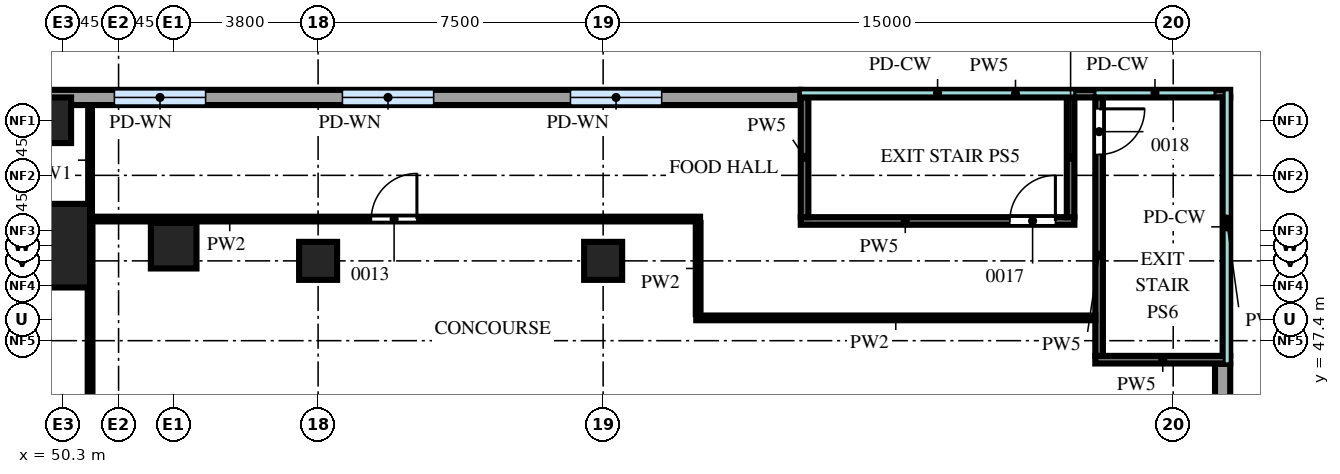
"""IFC4 building model, lengths in metres.
Left out: names, types, materials, properties, quantities, classifications, styles, units other than length and angle.
Written with IfcOpenShell. Run it as: python <this file> out.ifc"""

import sys

from ifc_helpers import new_model, si_unit, direction, frame, frame_2d, origin, origin_2d, place, context, subcontext, project, spatial, rectangle, extrude, source, transform, mapped, element, fill, save


model = new_model("IFC4")
c1 = context("Model", 3, precision=1e-05, world=origin(), true_north=direction((0.0, 1.0)))
c2 = subcontext(c1, "Body", "Model", "MODEL_VIEW")
j1 = project(units=[si_unit("LENGTHUNIT", "METRE"), si_unit("PLANEANGLEUNIT", "RADIAN")], contexts=[c1])
p1 = place(None, origin())
s1 = spatial("IfcSite", under=j1, at=p1, CompositionType="ELEMENT")
p2 = place(p1, origin())
s2 = spatial("IfcBuilding", under=s1, at=p2, CompositionType="ELEMENT")
p3 = place(p2, frame((0.0, 0.0, 13.0)))
s3 = spatial("IfcBuildingStorey", under=s2, at=p3, CompositionType="ELEMENT", Elevation=13.0)
m1 = source(origin(), c2, "Body", "SweptSolid", [
    extrude(rectangle(XDim=2.2, YDim=2.2, at=origin_2d()), origin(), (0.0, 0.0, 1.0), 5.2),
])
p4 = place(p3, frame((49.9, 49.9, 0.0), z_axis=(0.0, 0.0, 1.0), x_axis=(1.0, 0.0, 0.0)))
e1 = element("IfcColumn", 1, at=p4, inside=s3, PredefinedType="COLUMN", context=c2, shape_type="MappedRepresentation", body=[
    mapped(m1, transform((0.0, 0.0, 0.0))),
])
m2 = source(origin(), c2, "Body", "SweptSolid", [
    extrude(rectangle(XDim=1.2, YDim=1.2, at=origin_2d()), origin(), (0.0, 0.0, 1.0), 5.2),
])
for number, where, z_axis, x_axis in (
    (2, (53.2, 49.9, 0.0), (0.0, 0.0, 1.0), (1.0, 0.0, 0.0)),
    (3, (49.9, 53.2, 0.0), (0.0, 0.0, 1.0), (1.0, 0.0, 0.0)),
):
    element("IfcColumn", number, at=place(p3, frame(where, z_axis=z_axis, x_axis=x_axis)), inside=s3, PredefinedType="COLUMN", context=c2, shape_type="MappedRepresentation", body=[
        mapped(m2, transform((0.0, 0.0, 0.0))),
    ])
m3 = source(origin(), c2, "Body", "SweptSolid", [
    extrude(rectangle(XDim=1.0, YDim=1.0, at=origin_2d()), origin(), (0.0, 0.0, 1.0), 5.2),
])
for number, where, z_axis, x_axis in (
    (4, (57.0, 49.5, 0.0), (0.0, 0.0, 1.0), (1.0, 0.0, 0.0)),
    (5, (64.5, 49.5, 0.0), (0.0, 0.0, 1.0), (1.0, 0.0, 0.0)),
):
    element("IfcColumn", number, at=place(p3, frame(where, z_axis=z_axis, x_axis=x_axis)), inside=s3, PredefinedType="COLUMN", context=c2, shape_type="MappedRepresentation", body=[
        mapped(m3, transform((0.0, 0.0, 0.0))),
    ])
m4 = source(origin(), c2, "Body", "SweptSolid", [
    extrude(rectangle(XDim=39.58, YDim=0.4, at=frame_2d((19.79, 0.0))), origin(), (0.0, 0.0, 1.0), 5.2),
])
p5 = place(p3, frame((80.8, 7.21, 0.0), z_axis=(0.0, 0.0, 1.0), x_axis=(0.0, 1.0, 0.0)))
e6 = element("IfcWall", 6, at=p5, inside=s3, PredefinedType="SOLIDWALL", context=c2, shape_type="MappedRepresentation", body=[
    mapped(m4, transform((0.0, 0.0, 0.0))),
])
m5 = source(origin(), c2, "Body", "SweptSolid", [
    extrude(rectangle(XDim=2.4, YDim=2.4, at=frame_2d((1.2, 1.2))), frame((0.0, 0.21, 0.0), z_axis=(0.0, -1.0, 0.0), x_axis=(1.0, 0.0, 0.0)), (0.0, 0.0, 1.0), 0.42),
])
p6 = place(p5, frame((3.6, 0.0, 1.0)))
e7 = element("IfcOpeningElement", 7, at=p6, cuts=e6, PredefinedType="OPENING", context=c2, shape_type="MappedRepresentation", body=[
    mapped(m5, transform((0.0, 0.0, 0.0))),
])
p7 = place(p5, frame((9.6, 0.0, 1.0)))
e8 = element("IfcOpeningElement", 8, at=p7, cuts=e6, PredefinedType="OPENING", context=c2, shape_type="MappedRepresentation", body=[
    mapped(m5, transform((0.0, 0.0, 0.0))),
])
p8 = place(p5, frame((15.6, 0.0, 1.0)))
e9 = element("IfcOpeningElement", 9, at=p8, cuts=e6, PredefinedType="OPENING", context=c2, shape_type="MappedRepresentation", body=[
    mapped(m5, transform((0.0, 0.0, 0.0))),
])
p9 = place(p5, frame((21.6, 0.0, 1.0)))
e10 = element("IfcOpeningElement", 10, at=p9, cuts=e6, PredefinedType="OPENING", context=c2, shape_type="MappedRepresentation", body=[
    mapped(m5, transform((0.0, 0.0, 0.0))),
])
p10 = place(p5, frame((27.6, 0.0, 1.0)))
e11 = element("IfcOpeningElement", 11, at=p10, cuts=e6, PredefinedType="OPENING", context=c2, shape_type="MappedRepresentation", body=[
    mapped(m5, transform((0.0, 0.0, 0.0))),
])
p11 = place(p5, frame((33.6, 0.0, 1.0)))
e12 = element("IfcOpeningElement", 12, at=p11, cuts=e6, PredefinedType="OPENING", context=c2, shape_type="MappedRepresentation", body=[
    mapped(m5, transform((0.0, 0.0, 0.0))),
])
m6 = source(origin(), c2, "Body", "SweptSolid", [
    extrude(rectangle(XDim=27.74, YDim=0.4, at=frame_2d((13.87, 0.0))), origin(), (0.0, 0.0, 1.0), 5.2),
])
p12 = place(p3, frame((69.69, 53.8, 0.0), z_axis=(0.0, 0.0, 1.0), x_axis=(-1.0, 0.0, 0.0)))
e13 = element("IfcWall", 13, at=p12, inside=s3, PredefinedType="SOLIDWALL", context=c2, shape_type="MappedRepresentation", body=[
    mapped(m6, transform((0.0, 0.0, 0.0))),
])
p13 = place(p12, frame((3.65, 0.0, 1.0)))
e14 = element("IfcOpeningElement", 14, at=p13, cuts=e13, PredefinedType="OPENING", context=c2, shape_type="MappedRepresentation", body=[
    mapped(m5, transform((0.0, 0.0, 0.0))),
])
p14 = place(p12, frame((9.65, 0.0, 1.0)))
e15 = element("IfcOpeningElement", 15, at=p14, cuts=e13, PredefinedType="OPENING", context=c2, shape_type="MappedRepresentation", body=[
    mapped(m5, transform((0.0, 0.0, 0.0))),
])
p15 = place(p12, frame((15.65, 0.0, 1.0)))
e16 = element("IfcOpeningElement", 16, at=p15, cuts=e13, PredefinedType="OPENING", context=c2, shape_type="MappedRepresentation", body=[
    mapped(m5, transform((0.0, 0.0, 0.0))),
])
p16 = place(p12, frame((21.65, 0.0, 1.0)))
e17 = element("IfcOpeningElement", 17, at=p16, cuts=e13, PredefinedType="OPENING", context=c2, shape_type="MappedRepresentation", body=[
    mapped(m5, transform((0.0, 0.0, 0.0))),
])
m7 = source(origin(), c2, "Body", "SweptSolid", [
    extrude(rectangle(XDim=7.2, YDim=0.2, at=frame_2d((3.6, 0.0))), origin(), (0.0, 0.0, 1.0), 5.2),
])
p17 = place(p3, frame((69.7, 50.55, 0.0), z_axis=(0.0, 0.0, 1.0), x_axis=(1.0, 0.0, 0.0)))
e18 = element("IfcWall", 18, at=p17, inside=s3, PredefinedType="PARTITIONING", context=c2, shape_type="MappedRepresentation", body=[
    mapped(m7, transform((0.0, 0.0, 0.0))),
])
m8 = source(origin(), c2, "Body", "SweptSolid", [
    extrude(rectangle(XDim=1.2, YDim=2.1, at=frame_2d((0.6, 1.05))), frame((0.0, 0.11, 0.0), z_axis=(0.0, -1.0, 0.0), x_axis=(1.0, 0.0, 0.0)), (0.0, 0.0, 1.0), 0.22),
])
p18 = place(p17, frame((5.5, 0.0, 0.0)))
e19 = element("IfcOpeningElement", 19, at=p18, cuts=e18, PredefinedType="OPENING", context=c2, shape_type="MappedRepresentation", body=[
    mapped(m8, transform((0.0, 0.0, 0.0))),
])
m9 = source(origin(), c2, "Body", "SweptSolid", [
    extrude(rectangle(XDim=11.3, YDim=0.2, at=frame_2d((5.65, 0.0))), origin(), (0.0, 0.0, 1.0), 5.2),
])
p19 = place(p3, frame((69.7, 53.9, 0.0), z_axis=(0.0, 0.0, 1.0), x_axis=(1.0, 0.0, 0.0)))
e20 = element("IfcWall", 20, at=p19, inside=s3, PredefinedType="PARTITIONING", context=c2, shape_type="MappedRepresentation", body=[
    mapped(m9, transform((0.0, 0.0, 0.0))),
])
m10 = source(origin(), c2, "Body", "SweptSolid", [
    extrude(rectangle(XDim=3.15, YDim=0.2, at=frame_2d((1.575, 0.0))), origin(), (0.0, 0.0, 1.0), 5.2),
])
for number, where, z_axis, x_axis in (
    (21, (69.8, 50.65, 0.0), (0.0, 0.0, 1.0), (0.0, 1.0, 0.0)),
    (22, (76.8, 50.65, 0.0), (0.0, 0.0, 1.0), (0.0, 1.0, 0.0)),
):
    element("IfcWall", number, at=place(p3, frame(where, z_axis=z_axis, x_axis=x_axis)), inside=s3, PredefinedType="PARTITIONING", context=c2, shape_type="MappedRepresentation", body=[
        mapped(m10, transform((0.0, 0.0, 0.0))),
    ])
m11 = source(origin(), c2, "Body", "SweptSolid", [
    extrude(rectangle(XDim=3.55, YDim=0.2, at=frame_2d((1.775, 0.0))), origin(), (0.0, 0.0, 1.0), 5.2),
])
p20 = place(p3, frame((77.45, 46.9, 0.0), z_axis=(0.0, 0.0, 1.0), x_axis=(1.0, 0.0, 0.0)))
e23 = element("IfcWall", 23, at=p20, inside=s3, PredefinedType="PARTITIONING", context=c2, shape_type="MappedRepresentation", body=[
    mapped(m11, transform((0.0, 0.0, 0.0))),
])
m12 = source(origin(), c2, "Body", "SweptSolid", [
    extrude(rectangle(XDim=6.8, YDim=0.2, at=frame_2d((3.4, 0.0))), origin(), (0.0, 0.0, 1.0), 5.2),
])
p21 = place(p3, frame((77.55, 47.0, 0.0), z_axis=(0.0, 0.0, 1.0), x_axis=(0.0, 1.0, 0.0)))
e24 = element("IfcWall", 24, at=p21, inside=s3, PredefinedType="PARTITIONING", context=c2, shape_type="MappedRepresentation", body=[
    mapped(m12, transform((0.0, 0.0, 0.0))),
])
p22 = place(p21, frame((5.3, 0.0, 0.0)))
e25 = element("IfcOpeningElement", 25, at=p22, cuts=e24, PredefinedType="OPENING", context=c2, shape_type="MappedRepresentation", body=[
    mapped(m8, transform((0.0, 0.0, 0.0))),
])
p23 = place(p3, frame((80.9, 47.0, 0.0), z_axis=(0.0, 0.0, 1.0), x_axis=(0.0, 1.0, 0.0)))
e26 = element("IfcWall", 26, at=p23, inside=s3, PredefinedType="PARTITIONING", context=c2, shape_type="MappedRepresentation", body=[
    mapped(m12, transform((0.0, 0.0, 0.0))),
])
m13 = source(origin(), c2, "Body", "SweptSolid", [
    extrude(rectangle(XDim=12.9, YDim=0.125, at=frame_2d((6.45, 0.0))), origin(), (0.0, 0.0, 1.0), 5.2),
])
p24 = place(p3, frame((51.0, 37.6, 0.0), z_axis=(0.0, 0.0, 1.0), x_axis=(0.0, 1.0, 0.0)))
e27 = element("IfcWall", 27, at=p24, inside=s3, PredefinedType="PARTITIONING", context=c2, shape_type="MappedRepresentation", body=[
    mapped(m13, transform((0.0, 0.0, 0.0))),
])
m14 = source(origin(), c2, "Body", "SweptSolid", [
    extrude(rectangle(XDim=1.2, YDim=2.1, at=frame_2d((0.6, 1.05))), frame((0.0, 0.073, 0.0), z_axis=(0.0, -1.0, 0.0), x_axis=(1.0, 0.0, 0.0)), (0.0, 0.0, 1.0), 0.145),
])
p25 = place(p24, frame((5.85, 0.0, 0.0)))
e28 = element("IfcOpeningElement", 28, at=p25, cuts=e27, PredefinedType="OPENING", context=c2, shape_type="MappedRepresentation", body=[
    mapped(m14, transform((0.0, 0.0, 0.0))),
])
m15 = source(origin(), c2, "Body", "SweptSolid", [
    extrude(rectangle(XDim=10.5, YDim=0.125, at=frame_2d((5.25, 0.0))), origin(), (0.0, 0.0, 1.0), 5.2),
])
p26 = place(p3, frame((66.95, 48.0, 0.0), z_axis=(0.0, 0.0, 1.0), x_axis=(1.0, 0.0, 0.0)))
e29 = element("IfcWall", 29, at=p26, inside=s3, PredefinedType="PARTITIONING", context=c2, shape_type="MappedRepresentation", body=[
    mapped(m15, transform((0.0, 0.0, 0.0))),
])
m16 = source(origin(), c2, "Body", "SweptSolid", [
    extrude(rectangle(XDim=2.4, YDim=0.125, at=frame_2d((1.2, 0.0))), origin(), (0.0, 0.0, 1.0), 5.2),
])
p27 = place(p3, frame((67.0, 48.1, 0.0), z_axis=(0.0, 0.0, 1.0), x_axis=(0.0, 1.0, 0.0)))
e30 = element("IfcWall", 30, at=p27, inside=s3, PredefinedType="PARTITIONING", context=c2, shape_type="MappedRepresentation", body=[
    mapped(m16, transform((0.0, 0.0, 0.0))),
])
m17 = source(origin(), c2, "Body", "SweptSolid", [
    extrude(rectangle(XDim=16.1, YDim=0.125, at=frame_2d((8.05, 0.0))), origin(), (0.0, 0.0, 1.0), 5.2),
])
p28 = place(p3, frame((50.95, 50.6, 0.0), z_axis=(0.0, 0.0, 1.0), x_axis=(1.0, 0.0, 0.0)))
e31 = element("IfcWall", 31, at=p28, inside=s3, PredefinedType="PARTITIONING", context=c2, shape_type="MappedRepresentation", body=[
    mapped(m17, transform((0.0, 0.0, 0.0))),
])
p29 = place(p28, frame((7.45, 0.0, 0.0)))
e32 = element("IfcOpeningElement", 32, at=p29, cuts=e31, PredefinedType="OPENING", context=c2, shape_type="MappedRepresentation", body=[
    mapped(m14, transform((0.0, 0.0, 0.0))),
])
m18 = source(origin(), c2, "Body", "SweptSolid", [
    extrude(rectangle(XDim=2.9, YDim=0.1, at=frame_2d((1.45, 0.0))), origin(), (0.0, 0.0, 1.0), 5.2),
])
p30 = place(p3, frame((51.0, 50.7, 0.0), z_axis=(0.0, 0.0, 1.0), x_axis=(0.0, 1.0, 0.0)))
e33 = element("IfcWall", 33, at=p30, inside=s3, PredefinedType="PARTITIONING", context=c2, shape_type="MappedRepresentation", body=[
    mapped(m18, transform((0.0, 0.0, 0.0))),
])
m19 = source(origin(), c2, "Body", "SweptSolid", [
    extrude(rectangle(XDim=2.4, YDim=2.4, at=frame_2d((1.2, 1.2))), frame((0.0, 0.03, 0.0), z_axis=(0.0, -1.0, 0.0), x_axis=(1.0, 0.0, 0.0)), (0.0, 0.0, 1.0), 0.06),
])
p31 = place(p13, origin())
e34 = element("IfcWindow", 34, at=p31, inside=s3, PartitioningType="SINGLE_PANEL", PredefinedType="WINDOW", context=c2, shape_type="MappedRepresentation", body=[
    mapped(m19, transform((0.0, 0.0, 0.0))),
])
fill(e14, e34)
p32 = place(p14, origin())
e35 = element("IfcWindow", 35, at=p32, inside=s3, PartitioningType="SINGLE_PANEL", PredefinedType="WINDOW", context=c2, shape_type="MappedRepresentation", body=[
    mapped(m19, transform((0.0, 0.0, 0.0))),
])
fill(e15, e35)
p33 = place(p15, origin())
e36 = element("IfcWindow", 36, at=p33, inside=s3, PartitioningType="SINGLE_PANEL", PredefinedType="WINDOW", context=c2, shape_type="MappedRepresentation", body=[
    mapped(m19, transform((0.0, 0.0, 0.0))),
])
fill(e16, e36)
m20 = source(origin(), c2, "Body", "SweptSolid", [
    extrude(rectangle(XDim=1.2, YDim=2.1, at=frame_2d((0.6, 1.05))), frame((0.0, 0.025, 0.0), z_axis=(0.0, -1.0, 0.0), x_axis=(1.0, 0.0, 0.0)), (0.0, 0.0, 1.0), 0.05),
])
p34 = place(p29, origin())
e37 = element("IfcDoor", 37, at=p34, inside=s3, OperationType="SINGLE_SWING_LEFT", PredefinedType="DOOR", context=c2, shape_type="MappedRepresentation", body=[
    mapped(m20, transform((0.0, 0.0, 0.0))),
])
fill(e32, e37)
p35 = place(p18, origin())
e38 = element("IfcDoor", 38, at=p35, inside=s3, OperationType="SINGLE_SWING_LEFT", PredefinedType="DOOR", context=c2, shape_type="MappedRepresentation", body=[
    mapped(m20, transform((0.0, 0.0, 0.0))),
])
fill(e19, e38)
p36 = place(p22, origin())
e39 = element("IfcDoor", 39, at=p36, inside=s3, OperationType="SINGLE_SWING_RIGHT", PredefinedType="DOOR", context=c2, shape_type="MappedRepresentation", body=[
    mapped(m20, transform((0.0, 0.0, 0.0))),
])
fill(e25, e39)
save(model, sys.argv[1])
